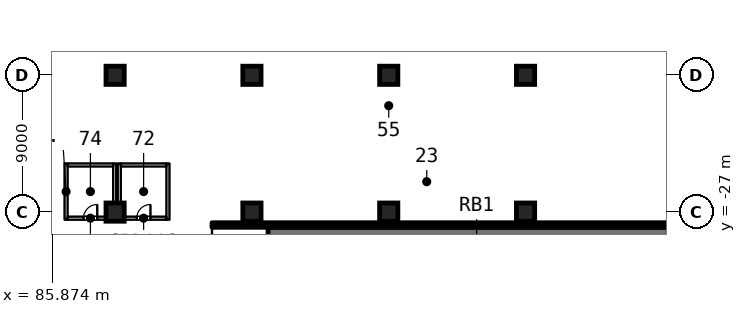
"""IFC4 building model, lengths in metres.
Left out: names, types, materials, properties, quantities, classifications, styles, units other than length and angle.
Written with IfcOpenShell. Run it as: python <this file> out.ifc"""

import sys

from ifc_helpers import new_model, si_unit, direction, frame, frame_2d, origin, origin_2d, place, context, subcontext, project, spatial, polyline, rectangle, outline, extrude, element, fill, save


model = new_model("IFC4")
c1 = context("Model", 3, precision=1e-05, world=origin(), true_north=direction((0.0, 1.0)))
c2 = subcontext(c1, "Body", "Model", "MODEL_VIEW")
j1 = project(units=[si_unit("LENGTHUNIT", "METRE"), si_unit("PLANEANGLEUNIT", "RADIAN")], contexts=[c1])
p1 = place(None, origin())
s1 = spatial("IfcSite", under=j1, at=p1, CompositionType="ELEMENT")
p2 = place(p1, origin())
s2 = spatial("IfcBuilding", under=s1, at=p2, CompositionType="ELEMENT")
p3 = place(p2, frame((0.0, 0.0, -4.5)))
s3 = spatial("IfcBuildingStorey", under=s2, at=p3, CompositionType="ELEMENT", Elevation=-4.5)
for number, where, z_axis, x_axis in (
    (1, (90.0, -27.0, 0.0), (0.0, 0.0, 1.0), (1.0, 0.0, 0.0)),
    (2, (90.0, -18.0, 0.0), (0.0, 0.0, 1.0), (1.0, 0.0, 0.0)),
    (3, (99.0, -27.0, 0.0), (0.0, 0.0, 1.0), (1.0, 0.0, 0.0)),
    (4, (99.0, -18.0, 0.0), (0.0, 0.0, 1.0), (1.0, 0.0, 0.0)),
    (5, (108.0, -27.0, 0.0), (0.0, 0.0, 1.0), (1.0, 0.0, 0.0)),
    (6, (108.0, -18.0, 0.0), (0.0, 0.0, 1.0), (1.0, 0.0, 0.0)),
    (7, (117.0, -27.0, 0.0), (0.0, 0.0, 1.0), (1.0, 0.0, 0.0)),
    (8, (117.0, -18.0, 0.0), (0.0, 0.0, 1.0), (1.0, 0.0, 0.0)),
):
    element("IfcColumn", number, at=place(p3, frame(where, z_axis=z_axis, x_axis=x_axis)), inside=s3, PredefinedType="COLUMN", context=c2, shape_type="SweptSolid", body=[
        extrude(rectangle(XDim=1.2, YDim=1.2, at=origin_2d()), origin(), (0.0, 0.0, 1.0), 4.5),
    ])
for number, where, z_axis, x_axis in (
    (9, (86.775, -27.5, 0.0), (0.0, 0.0, 1.0), (0.0, 1.0, 0.0)),
    (10, (89.975, -27.5, 0.0), (0.0, 0.0, 1.0), (0.0, 1.0, 0.0)),
    (11, (90.275, -27.5, 0.0), (0.0, 0.0, 1.0), (0.0, 1.0, 0.0)),
    (12, (93.475, -27.5, 0.0), (0.0, 0.0, 1.0), (0.0, 1.0, 0.0)),
):
    element("IfcWall", number, at=place(p3, frame(where, z_axis=z_axis, x_axis=x_axis)), inside=s3, PredefinedType="PARTITIONING", context=c2, shape_type="SweptSolid", body=[
        extrude(rectangle(XDim=3.7, YDim=0.2, at=frame_2d((1.85, 0.0))), origin(), (0.0, 0.0, 1.0), 4.05),
    ])
p4 = place(p3, frame((86.875, -27.4, 0.0), z_axis=(0.0, 0.0, 1.0), x_axis=(1.0, 0.0, 0.0)))
e13 = element("IfcWall", 13, at=p4, inside=s3, PredefinedType="PARTITIONING", context=c2, shape_type="SweptSolid", body=[
    extrude(rectangle(XDim=3.0, YDim=0.2, at=frame_2d((1.5, 0.0))), origin(), (0.0, 0.0, 1.0), 4.05),
])
p5 = place(p4, frame((1.05, 0.0, 0.0)))
e14 = element("IfcOpeningElement", 14, at=p5, cuts=e13, PredefinedType="OPENING", context=c2, shape_type="SweptSolid", body=[
    extrude(rectangle(XDim=0.9, YDim=2.1, at=frame_2d((0.45, 1.05))), frame((0.0, 0.11, 0.0), z_axis=(0.0, -1.0, 0.0), x_axis=(1.0, 0.0, 0.0)), (0.0, 0.0, 1.0), 0.22),
])
p6 = place(p3, frame((90.375, -27.4, 0.0), z_axis=(0.0, 0.0, 1.0), x_axis=(1.0, 0.0, 0.0)))
e15 = element("IfcWall", 15, at=p6, inside=s3, PredefinedType="PARTITIONING", context=c2, shape_type="SweptSolid", body=[
    extrude(rectangle(XDim=3.0, YDim=0.2, at=frame_2d((1.5, 0.0))), origin(), (0.0, 0.0, 1.0), 4.05),
])
p7 = place(p6, frame((1.05, 0.0, 0.0)))
e16 = element("IfcOpeningElement", 16, at=p7, cuts=e15, PredefinedType="OPENING", context=c2, shape_type="SweptSolid", body=[
    extrude(rectangle(XDim=0.9, YDim=2.1, at=frame_2d((0.45, 1.05))), frame((0.0, 0.11, 0.0), z_axis=(0.0, -1.0, 0.0), x_axis=(1.0, 0.0, 0.0)), (0.0, 0.0, 1.0), 0.22),
])
for number, where, z_axis, x_axis in (
    (17, (86.875, -23.9, 0.0), (0.0, 0.0, 1.0), (1.0, 0.0, 0.0)),
    (18, (90.375, -23.9, 0.0), (0.0, 0.0, 1.0), (1.0, 0.0, 0.0)),
):
    element("IfcWall", number, at=place(p3, frame(where, z_axis=z_axis, x_axis=x_axis)), inside=s3, PredefinedType="PARTITIONING", context=c2, shape_type="SweptSolid", body=[
        extrude(rectangle(XDim=3.0, YDim=0.2, at=frame_2d((1.5, 0.0))), origin(), (0.0, 0.0, 1.0), 4.05),
    ])
p8 = place(p3, frame((100.062, -31.5, 0.0), z_axis=(0.0, 0.0, 1.0), x_axis=(1.0, 0.0, 0.0)))
e19 = element("IfcWall", 19, at=p8, inside=s3, PredefinedType="SOLIDWALL", context=c2, shape_type="SweptSolid", body=[
    extrude(outline(polyline([(0.0, 0.0), (27.438, 0.0), (27.438, 4.2), (24.438, 3.96), (0.0, 0.05), (0.0, 0.0)])), frame((0.0, 3.5, 0.0), z_axis=(0.0, -1.0, 0.0), x_axis=(1.0, 0.0, 0.0)), (0.0, 0.0, 1.0), 7.0),
])
p9 = place(p3, frame((96.375, -27.85, 0.0), z_axis=(0.0, 0.0, 1.0), x_axis=(1.0, 0.0, 0.0)))
e20 = element("IfcWall", 20, at=p9, inside=s3, PredefinedType="SOLIDWALL", context=c2, shape_type="SweptSolid", body=[
    extrude(rectangle(XDim=11.5, YDim=0.3, at=frame_2d((5.75, 0.0))), origin(), (0.0, 0.0, 1.0), 4.05),
])
p10 = place(p3, frame((107.875, -27.85, 0.0), z_axis=(0.0, 0.0, 1.0), x_axis=(1.0, 0.0, 0.0)))
e21 = element("IfcWall", 21, at=p10, inside=s3, PredefinedType="SOLIDWALL", context=c2, shape_type="SweptSolid", body=[
    extrude(rectangle(XDim=19.125, YDim=0.3, at=frame_2d((9.562, 0.0))), origin(), (0.0, 0.0, 1.0), 5.6),
])
p11 = place(p7, origin())
e22 = element("IfcDoor", 22, at=p11, inside=s3, OperationType="SINGLE_SWING_RIGHT", PredefinedType="DOOR", context=c2, shape_type="SweptSolid", body=[
    extrude(rectangle(XDim=0.9, YDim=2.1, at=frame_2d((0.45, 1.05))), frame((0.0, 0.025, 0.0), z_axis=(0.0, -1.0, 0.0), x_axis=(1.0, 0.0, 0.0)), (0.0, 0.0, 1.0), 0.05),
])
fill(e16, e22)
p12 = place(p5, origin())
e23 = element("IfcDoor", 23, at=p12, inside=s3, OperationType="SINGLE_SWING_RIGHT", PredefinedType="DOOR", context=c2, shape_type="SweptSolid", body=[
    extrude(rectangle(XDim=0.9, YDim=2.1, at=frame_2d((0.45, 1.05))), frame((0.0, 0.025, 0.0), z_axis=(0.0, -1.0, 0.0), x_axis=(1.0, 0.0, 0.0)), (0.0, 0.0, 1.0), 0.05),
])
fill(e14, e23)
save(model, sys.argv[1])
